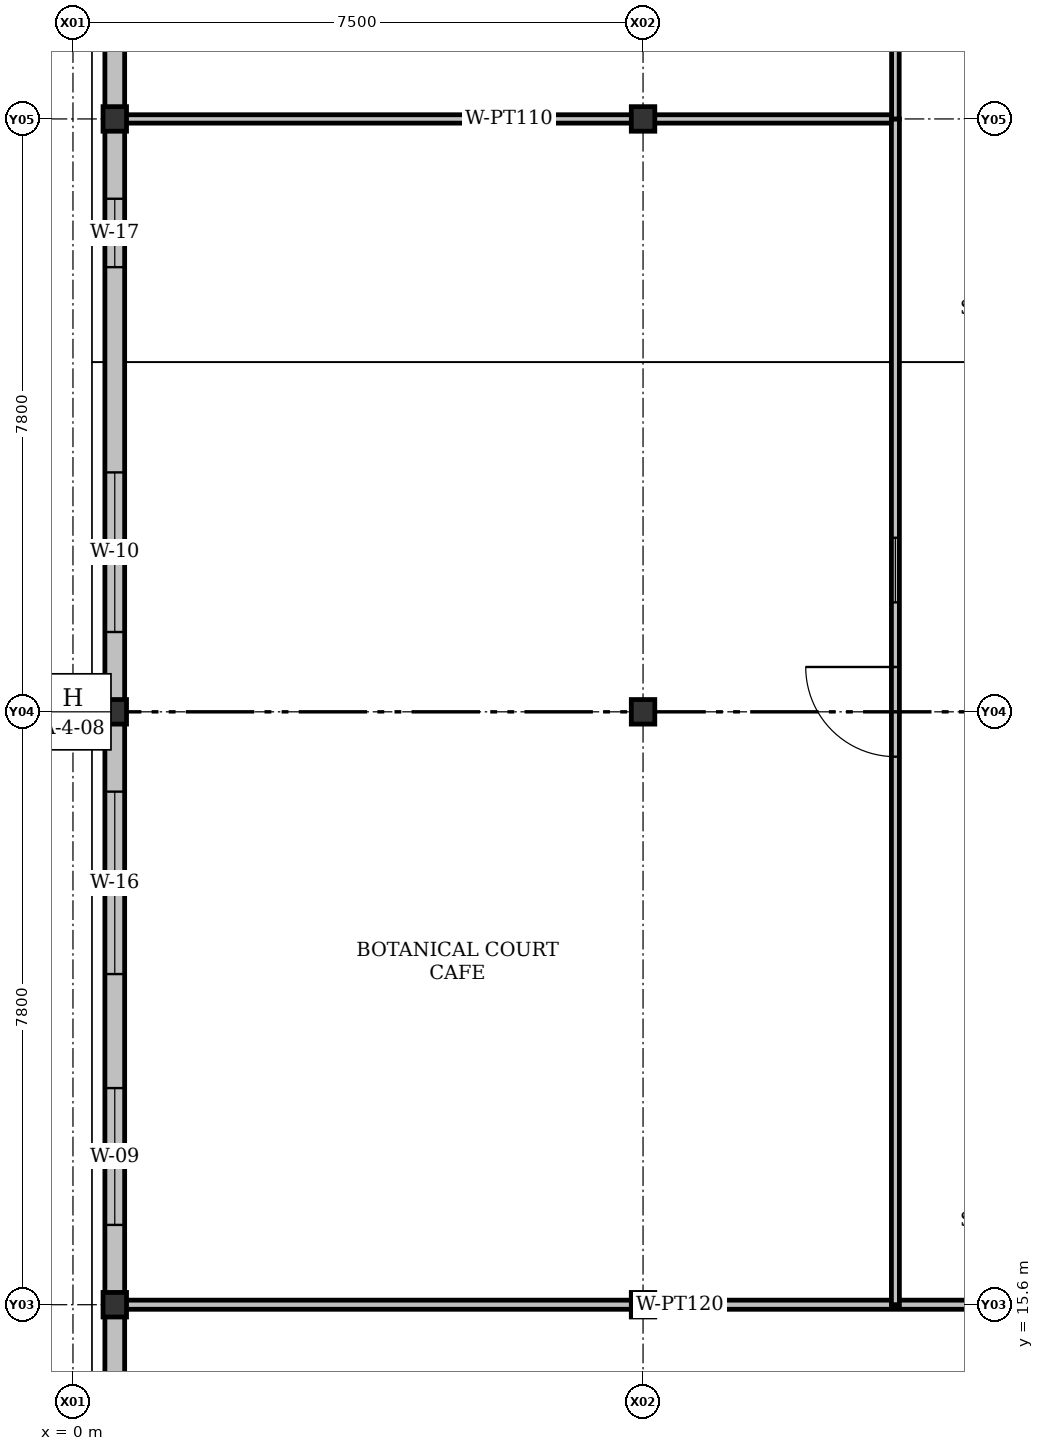
"""IFC4 building model, lengths in metres.
Left out: names, types, materials, properties, quantities, classifications, styles, units other than length and angle.
Written with IfcOpenShell. Run it as: python <this file> out.ifc"""

import sys

from ifc_helpers import new_model, si_unit, direction, frame, frame_2d, origin, origin_2d, place, context, subcontext, project, spatial, rectangle, i_section, extrude, element, fill, save


model = new_model("IFC4")
c1 = context("Model", 3, precision=1e-05, world=origin(), true_north=direction((0.0, 1.0)))
c2 = subcontext(c1, "Body", "Model", "MODEL_VIEW")
j1 = project(units=[si_unit("LENGTHUNIT", "METRE"), si_unit("PLANEANGLEUNIT", "RADIAN")], contexts=[c1])
p1 = place(None, origin())
s1 = spatial("IfcSite", under=j1, at=p1, CompositionType="ELEMENT")
p2 = place(p1, origin())
s2 = spatial("IfcBuilding", under=s1, at=p2, CompositionType="ELEMENT")
p3 = place(p2, origin())
s3 = spatial("IfcBuildingStorey", under=s2, at=p3, CompositionType="ELEMENT", Elevation=0.0)
for number, where, z_axis, x_axis in (
    (1, (0.55, 15.6, 0.0), (0.0, 0.0, 1.0), (1.0, 0.0, 0.0)),
    (2, (0.55, 23.4, 0.0), (0.0, 0.0, 1.0), (1.0, 0.0, 0.0)),
    (3, (0.55, 31.2, 0.0), (0.0, 0.0, 1.0), (1.0, 0.0, 0.0)),
    (4, (7.5, 15.6, 0.0), (0.0, 0.0, 1.0), (1.0, 0.0, 0.0)),
    (5, (7.5, 23.4, 0.0), (0.0, 0.0, 1.0), (1.0, 0.0, 0.0)),
    (6, (7.5, 31.2, 0.0), (0.0, 0.0, 1.0), (1.0, 0.0, 0.0)),
):
    element("IfcColumn", number, at=place(p3, frame(where, z_axis=z_axis, x_axis=x_axis)), inside=s3, PredefinedType="COLUMN", context=c2, shape_type="SweptSolid", body=[
        extrude(i_section(OverallWidth=0.309, OverallDepth=0.323, WebThickness=0.014, FlangeThickness=0.023, FilletRadius=0.015, at=origin_2d()), origin(), (0.0, 0.0, 1.0), 5.4),
    ])
p4 = place(p3, frame((0.55, 7.8, 0.0), z_axis=(0.0, 0.0, 1.0), x_axis=(0.0, 1.0, 0.0)))
e7 = element("IfcWall", 7, at=p4, inside=s3, PredefinedType="SOLIDWALL", context=c2, shape_type="SweptSolid", body=[
    extrude(rectangle(XDim=7.8, YDim=0.26, at=frame_2d((3.9, 0.0))), origin(), (0.0, 0.0, 1.0), 4.737),
])
p5 = place(p4, frame((1.05, 0.0, 0.92)))
e8 = element("IfcOpeningElement", 8, at=p5, cuts=e7, PredefinedType="OPENING", context=c2, shape_type="SweptSolid", body=[
    extrude(rectangle(XDim=1.5, YDim=1.55, at=frame_2d((0.75, 0.775))), frame((0.0, 0.13, 0.0), z_axis=(0.0, -1.0, 0.0), x_axis=(1.0, 0.0, 0.0)), (0.0, 0.0, 1.0), 0.26),
])
p6 = place(p4, frame((4.65, 0.0, 0.92)))
e9 = element("IfcOpeningElement", 9, at=p6, cuts=e7, PredefinedType="OPENING", context=c2, shape_type="SweptSolid", body=[
    extrude(rectangle(XDim=2.1, YDim=1.7, at=frame_2d((1.05, 0.85))), frame((0.0, 0.13, 0.0), z_axis=(0.0, -1.0, 0.0), x_axis=(1.0, 0.0, 0.0)), (0.0, 0.0, 1.0), 0.26),
])
p7 = place(p3, frame((0.55, 15.6, 0.0), z_axis=(0.0, 0.0, 1.0), x_axis=(0.0, 1.0, 0.0)))
e10 = element("IfcWall", 10, at=p7, inside=s3, PredefinedType="SOLIDWALL", context=c2, shape_type="SweptSolid", body=[
    extrude(rectangle(XDim=7.8, YDim=0.26, at=frame_2d((3.9, 0.0))), origin(), (0.0, 0.0, 1.0), 4.737),
])
p8 = place(p7, frame((1.05, 0.0, 0.92)))
e11 = element("IfcOpeningElement", 11, at=p8, cuts=e10, PredefinedType="OPENING", context=c2, shape_type="SweptSolid", body=[
    extrude(rectangle(XDim=1.8, YDim=1.55, at=frame_2d((0.9, 0.775))), frame((0.0, 0.13, 0.0), z_axis=(0.0, -1.0, 0.0), x_axis=(1.0, 0.0, 0.0)), (0.0, 0.0, 1.0), 0.26),
])
p9 = place(p7, frame((4.35, 0.0, 0.92)))
e12 = element("IfcOpeningElement", 12, at=p9, cuts=e10, PredefinedType="OPENING", context=c2, shape_type="SweptSolid", body=[
    extrude(rectangle(XDim=2.4, YDim=1.7, at=frame_2d((1.2, 0.85))), frame((0.0, 0.13, 0.0), z_axis=(0.0, -1.0, 0.0), x_axis=(1.0, 0.0, 0.0)), (0.0, 0.0, 1.0), 0.26),
])
p10 = place(p3, frame((0.55, 23.4, 0.0), z_axis=(0.0, 0.0, 1.0), x_axis=(0.0, 1.0, 0.0)))
e13 = element("IfcWall", 13, at=p10, inside=s3, PredefinedType="SOLIDWALL", context=c2, shape_type="SweptSolid", body=[
    extrude(rectangle(XDim=7.8, YDim=0.26, at=frame_2d((3.9, 0.0))), origin(), (0.0, 0.0, 1.0), 4.737),
])
p11 = place(p10, frame((1.05, 0.0, 0.92)))
e14 = element("IfcOpeningElement", 14, at=p11, cuts=e13, PredefinedType="OPENING", context=c2, shape_type="SweptSolid", body=[
    extrude(rectangle(XDim=2.1, YDim=1.55, at=frame_2d((1.05, 0.775))), frame((0.0, 0.13, 0.0), z_axis=(0.0, -1.0, 0.0), x_axis=(1.0, 0.0, 0.0)), (0.0, 0.0, 1.0), 0.26),
])
p12 = place(p10, frame((5.85, 0.0, 0.92)))
e15 = element("IfcOpeningElement", 15, at=p12, cuts=e13, PredefinedType="OPENING", context=c2, shape_type="SweptSolid", body=[
    extrude(rectangle(XDim=0.9, YDim=1.3, at=frame_2d((0.45, 0.65))), frame((0.0, 0.13, 0.0), z_axis=(0.0, -1.0, 0.0), x_axis=(1.0, 0.0, 0.0)), (0.0, 0.0, 1.0), 0.26),
])
p13 = place(p3, frame((0.55, 31.2, 0.0), z_axis=(0.0, 0.0, 1.0), x_axis=(0.0, 1.0, 0.0)))
e16 = element("IfcWall", 16, at=p13, inside=s3, PredefinedType="SOLIDWALL", context=c2, shape_type="SweptSolid", body=[
    extrude(rectangle(XDim=7.8, YDim=0.26, at=frame_2d((3.9, 0.0))), origin(), (0.0, 0.0, 1.0), 4.737),
])
p14 = place(p13, frame((1.05, 0.0, 0.92)))
e17 = element("IfcOpeningElement", 17, at=p14, cuts=e16, PredefinedType="OPENING", context=c2, shape_type="SweptSolid", body=[
    extrude(rectangle(XDim=2.4, YDim=1.55, at=frame_2d((1.2, 0.775))), frame((0.0, 0.13, 0.0), z_axis=(0.0, -1.0, 0.0), x_axis=(1.0, 0.0, 0.0)), (0.0, 0.0, 1.0), 0.26),
])
p15 = place(p13, frame((5.7, 0.0, 0.92)))
e18 = element("IfcOpeningElement", 18, at=p15, cuts=e16, PredefinedType="OPENING", context=c2, shape_type="SweptSolid", body=[
    extrude(rectangle(XDim=1.05, YDim=1.3, at=frame_2d((0.525, 0.65))), frame((0.0, 0.13, 0.0), z_axis=(0.0, -1.0, 0.0), x_axis=(1.0, 0.0, 0.0)), (0.0, 0.0, 1.0), 0.26),
])
p16 = place(p3, frame((0.65, 15.6, 0.0), z_axis=(0.0, 0.0, 1.0), x_axis=(1.0, 0.0, 0.0)))
e19 = element("IfcWall", 19, at=p16, inside=s3, PredefinedType="PARTITIONING", context=c2, shape_type="SweptSolid", body=[
    extrude(rectangle(XDim=14.67, YDim=0.12, at=frame_2d((7.335, 0.0))), origin(), (0.0, 0.0, 1.0), 4.661),
])
p17 = place(p16, frame((11.84, 0.0, 0.0)))
e20 = element("IfcOpeningElement", 20, at=p17, cuts=e19, PredefinedType="OPENING", context=c2, shape_type="SweptSolid", body=[
    extrude(rectangle(XDim=1.12, YDim=2.25, at=frame_2d((0.56, 1.125))), frame((0.0, 0.06, 0.0), z_axis=(0.0, -1.0, 0.0), x_axis=(1.0, 0.0, 0.0)), (0.0, 0.0, 1.0), 0.12),
])
p18 = place(p3, frame((0.65, 31.2, 0.0), z_axis=(0.0, 0.0, 1.0), x_axis=(1.0, 0.0, 0.0)))
e21 = element("IfcWall", 21, at=p18, inside=s3, PredefinedType="PARTITIONING", context=c2, shape_type="SweptSolid", body=[
    extrude(rectangle(XDim=10.17, YDim=0.11, at=frame_2d((5.085, 0.0))), origin(), (0.0, 0.0, 1.0), 4.661),
])
p19 = place(p3, frame((10.82, 15.6, 0.0), z_axis=(0.0, 0.0, 1.0), x_axis=(0.0, 1.0, 0.0)))
e22 = element("IfcWall", 22, at=p19, inside=s3, PredefinedType="PARTITIONING", context=c2, shape_type="SweptSolid", body=[
    extrude(rectangle(XDim=15.6, YDim=0.105, at=frame_2d((7.8, 0.0))), origin(), (0.0, 0.0, 1.0), 4.661),
])
p20 = place(p19, frame((7.21, 0.0, 0.0)))
e23 = element("IfcOpeningElement", 23, at=p20, cuts=e22, PredefinedType="OPENING", context=c2, shape_type="SweptSolid", body=[
    extrude(rectangle(XDim=1.18, YDim=2.25, at=frame_2d((0.59, 1.125))), frame((0.0, 0.052, 0.0), z_axis=(0.0, -1.0, 0.0), x_axis=(1.0, 0.0, 0.0)), (0.0, 0.0, 1.0), 0.105),
])
p21 = place(p19, frame((9.24, 0.0, 0.92)))
e24 = element("IfcOpeningElement", 24, at=p21, cuts=e22, PredefinedType="OPENING", context=c2, shape_type="SweptSolid", body=[
    extrude(rectangle(XDim=0.85, YDim=1.1, at=frame_2d((0.425, 0.55))), frame((0.0, 0.052, 0.0), z_axis=(0.0, -1.0, 0.0), x_axis=(1.0, 0.0, 0.0)), (0.0, 0.0, 1.0), 0.105),
])
p22 = place(p3, frame((10.82, 31.2, 0.0), z_axis=(0.0, 0.0, 1.0), x_axis=(0.0, 1.0, 0.0)))
e25 = element("IfcWall", 25, at=p22, inside=s3, PredefinedType="PARTITIONING", context=c2, shape_type="SweptSolid", body=[
    extrude(rectangle(XDim=22.95, YDim=0.1, at=frame_2d((11.475, 0.0))), origin(), (0.0, 0.0, 1.0), 3.8),
])
p23 = place(p22, frame((10.86, 0.0, 0.0)))
e26 = element("IfcOpeningElement", 26, at=p23, cuts=e25, PredefinedType="OPENING", context=c2, shape_type="SweptSolid", body=[
    extrude(rectangle(XDim=1.28, YDim=2.25, at=frame_2d((0.64, 1.125))), frame((0.0, 0.05, 0.0), z_axis=(0.0, -1.0, 0.0), x_axis=(1.0, 0.0, 0.0)), (0.0, 0.0, 1.0), 0.1),
])
p24 = place(p22, frame((12.99, 0.0, 0.92)))
e27 = element("IfcOpeningElement", 27, at=p24, cuts=e25, PredefinedType="OPENING", context=c2, shape_type="SweptSolid", body=[
    extrude(rectangle(XDim=0.95, YDim=1.1, at=frame_2d((0.475, 0.55))), frame((0.0, 0.05, 0.0), z_axis=(0.0, -1.0, 0.0), x_axis=(1.0, 0.0, 0.0)), (0.0, 0.0, 1.0), 0.1),
])
p25 = place(p8, origin())
e28 = element("IfcWindow", 28, at=p25, inside=s3, PartitioningType="DOUBLE_PANEL_VERTICAL", PredefinedType="WINDOW", context=c2, shape_type="SweptSolid", body=[
    extrude(rectangle(XDim=1.8, YDim=1.55, at=frame_2d((0.9, 0.775))), frame((0.0, 0.03, 0.0), z_axis=(0.0, -1.0, 0.0), x_axis=(1.0, 0.0, 0.0)), (0.0, 0.0, 1.0), 0.06),
])
fill(e11, e28)
p26 = place(p9, origin())
e29 = element("IfcWindow", 29, at=p26, inside=s3, PartitioningType="DOUBLE_PANEL_VERTICAL", PredefinedType="WINDOW", context=c2, shape_type="SweptSolid", body=[
    extrude(rectangle(XDim=2.4, YDim=1.7, at=frame_2d((1.2, 0.85))), frame((0.0, 0.03, 0.0), z_axis=(0.0, -1.0, 0.0), x_axis=(1.0, 0.0, 0.0)), (0.0, 0.0, 1.0), 0.06),
])
fill(e12, e29)
p27 = place(p11, origin())
e30 = element("IfcWindow", 30, at=p27, inside=s3, PartitioningType="DOUBLE_PANEL_VERTICAL", PredefinedType="WINDOW", context=c2, shape_type="SweptSolid", body=[
    extrude(rectangle(XDim=2.1, YDim=1.55, at=frame_2d((1.05, 0.775))), frame((0.0, 0.03, 0.0), z_axis=(0.0, -1.0, 0.0), x_axis=(1.0, 0.0, 0.0)), (0.0, 0.0, 1.0), 0.06),
])
fill(e14, e30)
p28 = place(p12, origin())
e31 = element("IfcWindow", 31, at=p28, inside=s3, PartitioningType="SINGLE_PANEL", PredefinedType="WINDOW", context=c2, shape_type="SweptSolid", body=[
    extrude(rectangle(XDim=0.9, YDim=1.3, at=frame_2d((0.45, 0.65))), frame((0.0, 0.03, 0.0), z_axis=(0.0, -1.0, 0.0), x_axis=(1.0, 0.0, 0.0)), (0.0, 0.0, 1.0), 0.06),
])
fill(e15, e31)
p29 = place(p20, origin())
e32 = element("IfcDoor", 32, at=p29, inside=s3, OperationType="SINGLE_SWING_RIGHT", PredefinedType="DOOR", context=c2, shape_type="SweptSolid", body=[
    extrude(rectangle(XDim=1.18, YDim=2.25, at=frame_2d((0.59, 1.125))), frame((0.0, 0.025, 0.0), z_axis=(0.0, -1.0, 0.0), x_axis=(1.0, 0.0, 0.0)), (0.0, 0.0, 1.0), 0.05),
])
fill(e23, e32)
p30 = place(p21, origin())
e33 = element("IfcWindow", 33, at=p30, inside=s3, PartitioningType="SINGLE_PANEL", PredefinedType="WINDOW", context=c2, shape_type="SweptSolid", body=[
    extrude(rectangle(XDim=0.85, YDim=1.1, at=frame_2d((0.425, 0.55))), frame((0.0, 0.03, 0.0), z_axis=(0.0, -1.0, 0.0), x_axis=(1.0, 0.0, 0.0)), (0.0, 0.0, 1.0), 0.06),
])
fill(e24, e33)
save(model, sys.argv[1])
